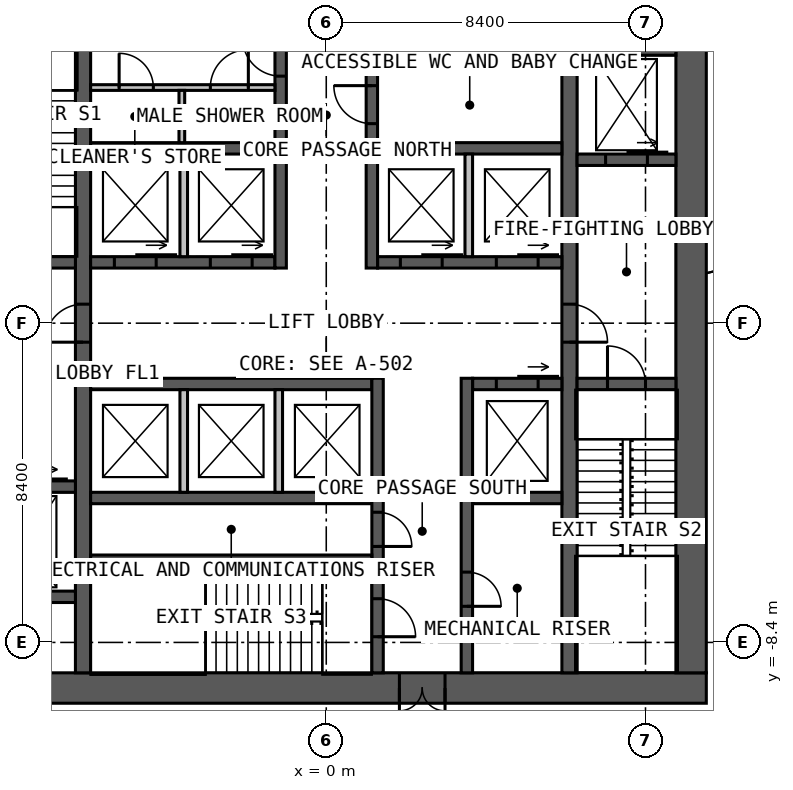
"""IFC4 building model, lengths in metres.
Left out: names, types, materials, properties, quantities, classifications, styles, units other than length and angle.
Written with IfcOpenShell. Run it as: python <this file> out.ifc"""

import sys

from ifc_helpers import new_model, si_unit, direction, frame, frame_2d, origin, place, context, subcontext, project, spatial, rectangle, extrude, element, fill, save


model = new_model("IFC4")
c1 = context("Model", 3, precision=1e-05, world=origin(), true_north=direction((0.0, 1.0)))
c2 = subcontext(c1, "Body", "Model", "MODEL_VIEW")
j1 = project(units=[si_unit("LENGTHUNIT", "METRE"), si_unit("PLANEANGLEUNIT", "RADIAN")], contexts=[c1])
p1 = place(None, origin())
s1 = spatial("IfcSite", under=j1, at=p1, CompositionType="ELEMENT")
p2 = place(p1, origin())
s2 = spatial("IfcBuilding", under=s1, at=p2, CompositionType="ELEMENT")
p3 = place(p2, frame((0.0, 0.0, 41.0)))
s3 = spatial("IfcBuildingStorey", under=s2, at=p3, CompositionType="ELEMENT", Elevation=41.0)
p4 = place(p3, frame((10.0, -9.6, 0.0), z_axis=(0.0, 0.0, 1.0), x_axis=(-1.0, 0.0, 0.0)))
e1 = element("IfcWall", 1, at=p4, inside=s3, PredefinedType="SOLIDWALL", context=c2, shape_type="SweptSolid", body=[
    extrude(rectangle(XDim=20.0, YDim=0.8, at=frame_2d((10.0, 0.0))), origin(), (0.0, 0.0, 1.0), 4.0),
])
p5 = place(p4, frame((6.875, 0.0, 0.0)))
e2 = element("IfcOpeningElement", 2, at=p5, cuts=e1, PredefinedType="OPENING", context=c2, shape_type="SweptSolid", body=[
    extrude(rectangle(XDim=1.2, YDim=2.2, at=frame_2d((0.6, 1.1))), frame((0.0, 0.41, 0.0), z_axis=(0.0, -1.0, 0.0), x_axis=(1.0, 0.0, 0.0)), (0.0, 0.0, 1.0), 0.82),
])
p6 = place(p3, frame((9.6, -9.2, 0.0), z_axis=(0.0, 0.0, 1.0), x_axis=(0.0, 1.0, 0.0)))
e3 = element("IfcWall", 3, at=p6, inside=s3, PredefinedType="SOLIDWALL", context=c2, shape_type="SweptSolid", body=[
    extrude(rectangle(XDim=18.4, YDim=0.8, at=frame_2d((9.2, 0.0))), origin(), (0.0, 0.0, 1.0), 4.0),
])
p7 = place(p3, frame((-6.4, -9.2, 0.0), z_axis=(0.0, 0.0, 1.0), x_axis=(0.0, 1.0, 0.0)))
e4 = element("IfcWall", 4, at=p7, inside=s3, PredefinedType="SOLIDWALL", context=c2, shape_type="SweptSolid", body=[
    extrude(rectangle(XDim=18.4, YDim=0.4, at=frame_2d((9.2, 0.0))), origin(), (0.0, 0.0, 1.0), 4.0),
])
p8 = place(p7, frame((8.7, 0.0, 0.0)))
e5 = element("IfcOpeningElement", 5, at=p8, cuts=e4, PredefinedType="OPENING", context=c2, shape_type="SweptSolid", body=[
    extrude(rectangle(XDim=1.0, YDim=2.2, at=frame_2d((0.5, 1.1))), frame((0.0, 0.21, 0.0), z_axis=(0.0, -1.0, 0.0), x_axis=(1.0, 0.0, 0.0)), (0.0, 0.0, 1.0), 0.42),
])
p9 = place(p3, frame((6.4, 9.2, 0.0), z_axis=(0.0, 0.0, 1.0), x_axis=(0.0, -1.0, 0.0)))
e6 = element("IfcWall", 6, at=p9, inside=s3, PredefinedType="SOLIDWALL", context=c2, shape_type="SweptSolid", body=[
    extrude(rectangle(XDim=18.4, YDim=0.4, at=frame_2d((9.2, 0.0))), origin(), (0.0, 0.0, 1.0), 4.0),
])
p10 = place(p9, frame((8.7, 0.0, 0.0)))
e7 = element("IfcOpeningElement", 7, at=p10, cuts=e6, PredefinedType="OPENING", context=c2, shape_type="SweptSolid", body=[
    extrude(rectangle(XDim=1.0, YDim=2.2, at=frame_2d((0.5, 1.1))), frame((0.0, 0.21, 0.0), z_axis=(0.0, -1.0, 0.0), x_axis=(1.0, 0.0, 0.0)), (0.0, 0.0, 1.0), 0.42),
])
p11 = place(p3, frame((-6.2, 1.6, 0.0), z_axis=(0.0, 0.0, 1.0), x_axis=(1.0, 0.0, 0.0)))
e8 = element("IfcWall", 8, at=p11, inside=s3, PredefinedType="SOLIDWALL", context=c2, shape_type="SweptSolid", body=[
    extrude(rectangle(XDim=4.85, YDim=0.3, at=frame_2d((2.425, 0.0))), origin(), (0.0, 0.0, 1.0), 4.0),
])
p12 = place(p11, frame((0.625, 0.0, 0.0)))
e9 = element("IfcOpeningElement", 9, at=p12, cuts=e8, PredefinedType="OPENING", context=c2, shape_type="SweptSolid", body=[
    extrude(rectangle(XDim=1.1, YDim=2.2, at=frame_2d((0.55, 1.1))), frame((0.0, 0.16, 0.0), z_axis=(0.0, -1.0, 0.0), x_axis=(1.0, 0.0, 0.0)), (0.0, 0.0, 1.0), 0.32),
])
p13 = place(p11, frame((3.15, 0.0, 0.0)))
e10 = element("IfcOpeningElement", 10, at=p13, cuts=e8, PredefinedType="OPENING", context=c2, shape_type="SweptSolid", body=[
    extrude(rectangle(XDim=1.1, YDim=2.2, at=frame_2d((0.55, 1.1))), frame((0.0, 0.16, 0.0), z_axis=(0.0, -1.0, 0.0), x_axis=(1.0, 0.0, 0.0)), (0.0, 0.0, 1.0), 0.32),
])
p14 = place(p3, frame((1.35, 1.6, 0.0), z_axis=(0.0, 0.0, 1.0), x_axis=(1.0, 0.0, 0.0)))
e11 = element("IfcWall", 11, at=p14, inside=s3, PredefinedType="SOLIDWALL", context=c2, shape_type="SweptSolid", body=[
    extrude(rectangle(XDim=4.85, YDim=0.3, at=frame_2d((2.425, 0.0))), origin(), (0.0, 0.0, 1.0), 4.0),
])
p15 = place(p14, frame((0.6, 0.0, 0.0)))
e12 = element("IfcOpeningElement", 12, at=p15, cuts=e11, PredefinedType="OPENING", context=c2, shape_type="SweptSolid", body=[
    extrude(rectangle(XDim=1.1, YDim=2.2, at=frame_2d((0.55, 1.1))), frame((0.0, 0.16, 0.0), z_axis=(0.0, -1.0, 0.0), x_axis=(1.0, 0.0, 0.0)), (0.0, 0.0, 1.0), 0.32),
])
p16 = place(p14, frame((3.125, 0.0, 0.0)))
e13 = element("IfcOpeningElement", 13, at=p16, cuts=e11, PredefinedType="OPENING", context=c2, shape_type="SweptSolid", body=[
    extrude(rectangle(XDim=1.1, YDim=2.2, at=frame_2d((0.55, 1.1))), frame((0.0, 0.16, 0.0), z_axis=(0.0, -1.0, 0.0), x_axis=(1.0, 0.0, 0.0)), (0.0, 0.0, 1.0), 0.32),
])
for number, where, z_axis, x_axis in (
    (14, (-6.2, 4.6, 0.0), (0.0, 0.0, 1.0), (1.0, 0.0, 0.0)),
    (15, (1.35, 4.6, 0.0), (0.0, 0.0, 1.0), (1.0, 0.0, 0.0)),
):
    element("IfcWall", number, at=place(p3, frame(where, z_axis=z_axis, x_axis=x_axis)), inside=s3, PredefinedType="SOLIDWALL", context=c2, shape_type="SweptSolid", body=[
        extrude(rectangle(XDim=4.85, YDim=0.3, at=frame_2d((2.425, 0.0))), origin(), (0.0, 0.0, 1.0), 4.0),
    ])
p17 = place(p3, frame((-1.2, 1.45, 0.0), z_axis=(0.0, 0.0, 1.0), x_axis=(0.0, 1.0, 0.0)))
e16 = element("IfcWall", 16, at=p17, inside=s3, PredefinedType="SOLIDWALL", context=c2, shape_type="SweptSolid", body=[
    extrude(rectangle(XDim=7.75, YDim=0.3, at=frame_2d((3.875, 0.0))), origin(), (0.0, 0.0, 1.0), 4.0),
])
p18 = place(p17, frame((5.05, 0.0, 0.0)))
e17 = element("IfcOpeningElement", 17, at=p18, cuts=e16, PredefinedType="OPENING", context=c2, shape_type="SweptSolid", body=[
    extrude(rectangle(XDim=1.0, YDim=2.2, at=frame_2d((0.5, 1.1))), frame((0.0, 0.16, 0.0), z_axis=(0.0, -1.0, 0.0), x_axis=(1.0, 0.0, 0.0)), (0.0, 0.0, 1.0), 0.32),
])
p19 = place(p3, frame((1.2, 1.45, 0.0), z_axis=(0.0, 0.0, 1.0), x_axis=(0.0, 1.0, 0.0)))
e18 = element("IfcWall", 18, at=p19, inside=s3, PredefinedType="SOLIDWALL", context=c2, shape_type="SweptSolid", body=[
    extrude(rectangle(XDim=7.75, YDim=0.3, at=frame_2d((3.875, 0.0))), origin(), (0.0, 0.0, 1.0), 4.0),
])
p20 = place(p19, frame((3.8, 0.0, 0.0)))
e19 = element("IfcOpeningElement", 19, at=p20, cuts=e18, PredefinedType="OPENING", context=c2, shape_type="SweptSolid", body=[
    extrude(rectangle(XDim=1.0, YDim=2.2, at=frame_2d((0.5, 1.1))), frame((0.0, 0.16, 0.0), z_axis=(0.0, -1.0, 0.0), x_axis=(1.0, 0.0, 0.0)), (0.0, 0.0, 1.0), 0.32),
])
p21 = place(p19, frame((6.15, 0.0, 0.0)))
e20 = element("IfcOpeningElement", 20, at=p21, cuts=e18, PredefinedType="OPENING", context=c2, shape_type="SweptSolid", body=[
    extrude(rectangle(XDim=1.0, YDim=2.2, at=frame_2d((0.5, 1.1))), frame((0.0, 0.16, 0.0), z_axis=(0.0, -1.0, 0.0), x_axis=(1.0, 0.0, 0.0)), (0.0, 0.0, 1.0), 0.32),
])
p22 = place(p3, frame((-6.2, -1.6, 0.0), z_axis=(0.0, 0.0, 1.0), x_axis=(1.0, 0.0, 0.0)))
e21 = element("IfcWall", 21, at=p22, inside=s3, PredefinedType="SOLIDWALL", context=c2, shape_type="SweptSolid", body=[
    extrude(rectangle(XDim=7.4, YDim=0.3, at=frame_2d((3.7, 0.0))), origin(), (0.0, 0.0, 1.0), 4.0),
])
p23 = place(p3, frame((3.85, -1.6, 0.0), z_axis=(0.0, 0.0, 1.0), x_axis=(1.0, 0.0, 0.0)))
e22 = element("IfcWall", 22, at=p23, inside=s3, PredefinedType="SOLIDWALL", context=c2, shape_type="SweptSolid", body=[
    extrude(rectangle(XDim=2.35, YDim=0.3, at=frame_2d((1.175, 0.0))), origin(), (0.0, 0.0, 1.0), 4.0),
])
p24 = place(p23, frame((0.625, 0.0, 0.0)))
e23 = element("IfcOpeningElement", 23, at=p24, cuts=e22, PredefinedType="OPENING", context=c2, shape_type="SweptSolid", body=[
    extrude(rectangle(XDim=1.1, YDim=2.2, at=frame_2d((0.55, 1.1))), frame((0.0, 0.16, 0.0), z_axis=(0.0, -1.0, 0.0), x_axis=(1.0, 0.0, 0.0)), (0.0, 0.0, 1.0), 0.32),
])
p25 = place(p3, frame((-6.2, -4.6, 0.0), z_axis=(0.0, 0.0, 1.0), x_axis=(1.0, 0.0, 0.0)))
e24 = element("IfcWall", 24, at=p25, inside=s3, PredefinedType="SOLIDWALL", context=c2, shape_type="SweptSolid", body=[
    extrude(rectangle(XDim=7.4, YDim=0.3, at=frame_2d((3.7, 0.0))), origin(), (0.0, 0.0, 1.0), 4.0),
])
p26 = place(p3, frame((3.85, -4.6, 0.0), z_axis=(0.0, 0.0, 1.0), x_axis=(1.0, 0.0, 0.0)))
e25 = element("IfcWall", 25, at=p26, inside=s3, PredefinedType="SOLIDWALL", context=c2, shape_type="SweptSolid", body=[
    extrude(rectangle(XDim=2.35, YDim=0.3, at=frame_2d((1.175, 0.0))), origin(), (0.0, 0.0, 1.0), 4.0),
])
p27 = place(p3, frame((1.35, -1.45, 0.0), z_axis=(0.0, 0.0, 1.0), x_axis=(0.0, -1.0, 0.0)))
e26 = element("IfcWall", 26, at=p27, inside=s3, PredefinedType="SOLIDWALL", context=c2, shape_type="SweptSolid", body=[
    extrude(rectangle(XDim=7.75, YDim=0.3, at=frame_2d((3.875, 0.0))), origin(), (0.0, 0.0, 1.0), 4.0),
])
p28 = place(p27, frame((5.8, 0.0, 0.0)))
e27 = element("IfcOpeningElement", 27, at=p28, cuts=e26, PredefinedType="OPENING", context=c2, shape_type="SweptSolid", body=[
    extrude(rectangle(XDim=1.0, YDim=2.2, at=frame_2d((0.5, 1.1))), frame((0.0, 0.16, 0.0), z_axis=(0.0, -1.0, 0.0), x_axis=(1.0, 0.0, 0.0)), (0.0, 0.0, 1.0), 0.32),
])
p29 = place(p27, frame((3.525, 0.0, 0.0)))
e28 = element("IfcOpeningElement", 28, at=p29, cuts=e26, PredefinedType="OPENING", context=c2, shape_type="SweptSolid", body=[
    extrude(rectangle(XDim=0.9, YDim=2.2, at=frame_2d((0.45, 1.1))), frame((0.0, 0.16, 0.0), z_axis=(0.0, -1.0, 0.0), x_axis=(1.0, 0.0, 0.0)), (0.0, 0.0, 1.0), 0.32),
])
p30 = place(p3, frame((3.7, -1.45, 0.0), z_axis=(0.0, 0.0, 1.0), x_axis=(0.0, -1.0, 0.0)))
e29 = element("IfcWall", 29, at=p30, inside=s3, PredefinedType="SOLIDWALL", context=c2, shape_type="SweptSolid", body=[
    extrude(rectangle(XDim=7.75, YDim=0.3, at=frame_2d((3.875, 0.0))), origin(), (0.0, 0.0, 1.0), 4.0),
])
p31 = place(p30, frame((5.1, 0.0, 0.0)))
e30 = element("IfcOpeningElement", 30, at=p31, cuts=e29, PredefinedType="OPENING", context=c2, shape_type="SweptSolid", body=[
    extrude(rectangle(XDim=0.9, YDim=2.2, at=frame_2d((0.45, 1.1))), frame((0.0, 0.16, 0.0), z_axis=(0.0, -1.0, 0.0), x_axis=(1.0, 0.0, 0.0)), (0.0, 0.0, 1.0), 0.32),
])
p32 = place(p3, frame((-6.2, -6.2, 0.0), z_axis=(0.0, 0.0, 1.0), x_axis=(1.0, 0.0, 0.0)))
e31 = element("IfcWall", 31, at=p32, inside=s3, PredefinedType="SOLIDWALL", context=c2, shape_type="SweptSolid", body=[
    extrude(rectangle(XDim=7.4, YDim=0.2, at=frame_2d((3.7, 0.0))), origin(), (0.0, 0.0, 1.0), 4.0),
])
p33 = place(p3, frame((-9.2, 1.6, 0.0), z_axis=(0.0, 0.0, 1.0), x_axis=(1.0, 0.0, 0.0)))
e32 = element("IfcWall", 32, at=p33, inside=s3, PredefinedType="SOLIDWALL", context=c2, shape_type="SweptSolid", body=[
    extrude(rectangle(XDim=2.6, YDim=0.3, at=frame_2d((1.3, 0.0))), origin(), (0.0, 0.0, 1.0), 4.0),
])
p34 = place(p33, frame((0.8, 0.0, 0.0)))
e33 = element("IfcOpeningElement", 33, at=p34, cuts=e32, PredefinedType="OPENING", context=c2, shape_type="SweptSolid", body=[
    extrude(rectangle(XDim=1.0, YDim=2.2, at=frame_2d((0.5, 1.1))), frame((0.0, 0.16, 0.0), z_axis=(0.0, -1.0, 0.0), x_axis=(1.0, 0.0, 0.0)), (0.0, 0.0, 1.0), 0.32),
])
p35 = place(p3, frame((6.6, -1.6, 0.0), z_axis=(0.0, 0.0, 1.0), x_axis=(1.0, 0.0, 0.0)))
e34 = element("IfcWall", 34, at=p35, inside=s3, PredefinedType="SOLIDWALL", context=c2, shape_type="SweptSolid", body=[
    extrude(rectangle(XDim=2.6, YDim=0.3, at=frame_2d((1.3, 0.0))), origin(), (0.0, 0.0, 1.0), 4.0),
])
p36 = place(p35, frame((0.8, 0.0, 0.0)))
e35 = element("IfcOpeningElement", 35, at=p36, cuts=e34, PredefinedType="OPENING", context=c2, shape_type="SweptSolid", body=[
    extrude(rectangle(XDim=1.0, YDim=2.2, at=frame_2d((0.5, 1.1))), frame((0.0, 0.16, 0.0), z_axis=(0.0, -1.0, 0.0), x_axis=(1.0, 0.0, 0.0)), (0.0, 0.0, 1.0), 0.32),
])
p37 = place(p3, frame((-9.2, -4.3, 0.0), z_axis=(0.0, 0.0, 1.0), x_axis=(1.0, 0.0, 0.0)))
e36 = element("IfcWall", 36, at=p37, inside=s3, PredefinedType="SOLIDWALL", context=c2, shape_type="SweptSolid", body=[
    extrude(rectangle(XDim=2.6, YDim=0.3, at=frame_2d((1.3, 0.0))), origin(), (0.0, 0.0, 1.0), 4.0),
])
p38 = place(p37, frame((0.75, 0.0, 0.0)))
e37 = element("IfcOpeningElement", 37, at=p38, cuts=e36, PredefinedType="OPENING", context=c2, shape_type="SweptSolid", body=[
    extrude(rectangle(XDim=1.1, YDim=2.2, at=frame_2d((0.55, 1.1))), frame((0.0, 0.16, 0.0), z_axis=(0.0, -1.0, 0.0), x_axis=(1.0, 0.0, 0.0)), (0.0, 0.0, 1.0), 0.32),
])
p39 = place(p3, frame((6.6, 4.3, 0.0), z_axis=(0.0, 0.0, 1.0), x_axis=(1.0, 0.0, 0.0)))
e38 = element("IfcWall", 38, at=p39, inside=s3, PredefinedType="SOLIDWALL", context=c2, shape_type="SweptSolid", body=[
    extrude(rectangle(XDim=2.6, YDim=0.3, at=frame_2d((1.3, 0.0))), origin(), (0.0, 0.0, 1.0), 4.0),
])
p40 = place(p39, frame((0.75, 0.0, 0.0)))
e39 = element("IfcOpeningElement", 39, at=p40, cuts=e38, PredefinedType="OPENING", context=c2, shape_type="SweptSolid", body=[
    extrude(rectangle(XDim=1.1, YDim=2.2, at=frame_2d((0.55, 1.1))), frame((0.0, 0.16, 0.0), z_axis=(0.0, -1.0, 0.0), x_axis=(1.0, 0.0, 0.0)), (0.0, 0.0, 1.0), 0.32),
])
for number, where, z_axis, x_axis in (
    (40, (-9.2, -7.2, 0.0), (0.0, 0.0, 1.0), (1.0, 0.0, 0.0)),
    (41, (6.6, 7.2, 0.0), (0.0, 0.0, 1.0), (1.0, 0.0, 0.0)),
):
    element("IfcWall", number, at=place(p3, frame(where, z_axis=z_axis, x_axis=x_axis)), inside=s3, PredefinedType="SOLIDWALL", context=c2, shape_type="SweptSolid", body=[
        extrude(rectangle(XDim=2.6, YDim=0.3, at=frame_2d((1.3, 0.0))), origin(), (0.0, 0.0, 1.0), 4.0),
    ])
for number, where, z_axis, x_axis in (
    (42, (-3.75, 1.75, 0.0), (0.0, 0.0, 1.0), (0.0, 1.0, 0.0)),
    (43, (3.75, 1.75, 0.0), (0.0, 0.0, 1.0), (0.0, 1.0, 0.0)),
    (44, (-3.75, -1.75, 0.0), (0.0, 0.0, 1.0), (0.0, -1.0, 0.0)),
    (45, (-1.25, -1.75, 0.0), (0.0, 0.0, 1.0), (0.0, -1.0, 0.0)),
):
    element("IfcWall", number, at=place(p3, frame(where, z_axis=z_axis, x_axis=x_axis)), inside=s3, PredefinedType="SOLIDWALL", context=c2, shape_type="SweptSolid", body=[
        extrude(rectangle(XDim=2.7, YDim=0.2, at=frame_2d((1.35, 0.0))), origin(), (0.0, 0.0, 1.0), 3.75),
    ])
p41 = place(p3, frame((1.35, 6.8, 0.0), z_axis=(0.0, 0.0, 1.0), x_axis=(1.0, 0.0, 0.0)))
e46 = element("IfcWall", 46, at=p41, inside=s3, PredefinedType="PARTITIONING", context=c2, shape_type="SweptSolid", body=[
    extrude(rectangle(XDim=4.85, YDim=0.15, at=frame_2d((2.425, 0.0))), origin(), (0.0, 0.0, 1.0), 3.75),
])
p42 = place(p3, frame((-6.2, 6.2, 0.0), z_axis=(0.0, 0.0, 1.0), x_axis=(1.0, 0.0, 0.0)))
e47 = element("IfcWall", 47, at=p42, inside=s3, PredefinedType="PARTITIONING", context=c2, shape_type="SweptSolid", body=[
    extrude(rectangle(XDim=4.85, YDim=0.15, at=frame_2d((2.425, 0.0))), origin(), (0.0, 0.0, 1.0), 3.75),
])
p43 = place(p42, frame((3.15, 0.0, 0.0)))
e48 = element("IfcOpeningElement", 48, at=p43, cuts=e47, PredefinedType="OPENING", context=c2, shape_type="SweptSolid", body=[
    extrude(rectangle(XDim=1.0, YDim=2.2, at=frame_2d((0.5, 1.1))), frame((0.0, 0.085, 0.0), z_axis=(0.0, -1.0, 0.0), x_axis=(1.0, 0.0, 0.0)), (0.0, 0.0, 1.0), 0.17),
])
p44 = place(p42, frame((0.75, 0.0, 0.0)))
e49 = element("IfcOpeningElement", 49, at=p44, cuts=e47, PredefinedType="OPENING", context=c2, shape_type="SweptSolid", body=[
    extrude(rectangle(XDim=0.9, YDim=2.2, at=frame_2d((0.45, 1.1))), frame((0.0, 0.085, 0.0), z_axis=(0.0, -1.0, 0.0), x_axis=(1.0, 0.0, 0.0)), (0.0, 0.0, 1.0), 0.17),
])
p45 = place(p3, frame((-3.8, 4.75, 0.0), z_axis=(0.0, 0.0, 1.0), x_axis=(0.0, 1.0, 0.0)))
e50 = element("IfcWall", 50, at=p45, inside=s3, PredefinedType="PARTITIONING", context=c2, shape_type="SweptSolid", body=[
    extrude(rectangle(XDim=1.375, YDim=0.15, at=frame_2d((0.688, 0.0))), origin(), (0.0, 0.0, 1.0), 3.75),
])
p46 = place(p5, origin())
e51 = element("IfcDoor", 51, at=p46, inside=s3, OperationType="DOUBLE_DOOR_SINGLE_SWING", PredefinedType="DOOR", context=c2, shape_type="SweptSolid", body=[
    extrude(rectangle(XDim=1.2, YDim=2.2, at=frame_2d((0.6, 1.1))), frame((0.0, 0.025, 0.0), z_axis=(0.0, -1.0, 0.0), x_axis=(1.0, 0.0, 0.0)), (0.0, 0.0, 1.0), 0.05),
])
fill(e2, e51)
p47 = place(p8, origin())
e52 = element("IfcDoor", 52, at=p47, inside=s3, OperationType="SINGLE_SWING_LEFT", PredefinedType="DOOR", context=c2, shape_type="SweptSolid", body=[
    extrude(rectangle(XDim=1.0, YDim=2.2, at=frame_2d((0.5, 1.1))), frame((0.0, 0.025, 0.0), z_axis=(0.0, -1.0, 0.0), x_axis=(1.0, 0.0, 0.0)), (0.0, 0.0, 1.0), 0.05),
])
fill(e5, e52)
p48 = place(p10, origin())
e53 = element("IfcDoor", 53, at=p48, inside=s3, OperationType="SINGLE_SWING_RIGHT", PredefinedType="DOOR", context=c2, shape_type="SweptSolid", body=[
    extrude(rectangle(XDim=1.0, YDim=2.2, at=frame_2d((0.5, 1.1))), frame((0.0, 0.025, 0.0), z_axis=(0.0, -1.0, 0.0), x_axis=(1.0, 0.0, 0.0)), (0.0, 0.0, 1.0), 0.05),
])
fill(e7, e53)
p49 = place(p36, origin())
e54 = element("IfcDoor", 54, at=p49, inside=s3, OperationType="SINGLE_SWING_LEFT", PredefinedType="DOOR", context=c2, shape_type="SweptSolid", body=[
    extrude(rectangle(XDim=1.0, YDim=2.2, at=frame_2d((0.5, 1.1))), frame((0.0, 0.025, 0.0), z_axis=(0.0, -1.0, 0.0), x_axis=(1.0, 0.0, 0.0)), (0.0, 0.0, 1.0), 0.05),
])
fill(e35, e54)
p50 = place(p28, origin())
e55 = element("IfcDoor", 55, at=p50, inside=s3, OperationType="SINGLE_SWING_RIGHT", PredefinedType="DOOR", context=c2, shape_type="SweptSolid", body=[
    extrude(rectangle(XDim=1.0, YDim=2.2, at=frame_2d((0.5, 1.1))), frame((0.0, 0.025, 0.0), z_axis=(0.0, -1.0, 0.0), x_axis=(1.0, 0.0, 0.0)), (0.0, 0.0, 1.0), 0.05),
])
fill(e27, e55)
p51 = place(p18, origin())
e56 = element("IfcDoor", 56, at=p51, inside=s3, OperationType="SINGLE_SWING_RIGHT", PredefinedType="DOOR", context=c2, shape_type="SweptSolid", body=[
    extrude(rectangle(XDim=1.0, YDim=2.2, at=frame_2d((0.5, 1.1))), frame((0.0, 0.025, 0.0), z_axis=(0.0, -1.0, 0.0), x_axis=(1.0, 0.0, 0.0)), (0.0, 0.0, 1.0), 0.05),
])
fill(e17, e56)
p52 = place(p20, origin())
e57 = element("IfcDoor", 57, at=p52, inside=s3, OperationType="SINGLE_SWING_RIGHT", PredefinedType="DOOR", context=c2, shape_type="SweptSolid", body=[
    extrude(rectangle(XDim=1.0, YDim=2.2, at=frame_2d((0.5, 1.1))), frame((0.0, 0.025, 0.0), z_axis=(0.0, -1.0, 0.0), x_axis=(1.0, 0.0, 0.0)), (0.0, 0.0, 1.0), 0.05),
])
fill(e19, e57)
p53 = place(p29, origin())
e58 = element("IfcDoor", 58, at=p53, inside=s3, OperationType="SINGLE_SWING_RIGHT", PredefinedType="DOOR", context=c2, shape_type="SweptSolid", body=[
    extrude(rectangle(XDim=0.9, YDim=2.2, at=frame_2d((0.45, 1.1))), frame((0.0, 0.025, 0.0), z_axis=(0.0, -1.0, 0.0), x_axis=(1.0, 0.0, 0.0)), (0.0, 0.0, 1.0), 0.05),
])
fill(e28, e58)
p54 = place(p31, origin())
e59 = element("IfcDoor", 59, at=p54, inside=s3, OperationType="SINGLE_SWING_RIGHT", PredefinedType="DOOR", context=c2, shape_type="SweptSolid", body=[
    extrude(rectangle(XDim=0.9, YDim=2.2, at=frame_2d((0.45, 1.1))), frame((0.0, 0.025, 0.0), z_axis=(0.0, -1.0, 0.0), x_axis=(1.0, 0.0, 0.0)), (0.0, 0.0, 1.0), 0.05),
])
fill(e30, e59)
p55 = place(p43, origin())
e60 = element("IfcDoor", 60, at=p55, inside=s3, OperationType="SINGLE_SWING_RIGHT", PredefinedType="DOOR", context=c2, shape_type="SweptSolid", body=[
    extrude(rectangle(XDim=1.0, YDim=2.2, at=frame_2d((0.5, 1.1))), frame((0.0, 0.025, 0.0), z_axis=(0.0, -1.0, 0.0), x_axis=(1.0, 0.0, 0.0)), (0.0, 0.0, 1.0), 0.05),
])
fill(e48, e60)
p56 = place(p44, origin())
e61 = element("IfcDoor", 61, at=p56, inside=s3, OperationType="SINGLE_SWING_LEFT", PredefinedType="DOOR", context=c2, shape_type="SweptSolid", body=[
    extrude(rectangle(XDim=0.9, YDim=2.2, at=frame_2d((0.45, 1.1))), frame((0.0, 0.025, 0.0), z_axis=(0.0, -1.0, 0.0), x_axis=(1.0, 0.0, 0.0)), (0.0, 0.0, 1.0), 0.05),
])
fill(e49, e61)
p57 = place(p12, origin())
e62 = element("IfcDoor", 62, at=p57, inside=s3, OperationType="SLIDING_TO_LEFT", PredefinedType="DOOR", context=c2, shape_type="SweptSolid", body=[
    extrude(rectangle(XDim=1.1, YDim=2.2, at=frame_2d((0.55, 1.1))), frame((0.0, 0.025, 0.0), z_axis=(0.0, -1.0, 0.0), x_axis=(1.0, 0.0, 0.0)), (0.0, 0.0, 1.0), 0.05),
])
fill(e9, e62)
p58 = place(p13, origin())
e63 = element("IfcDoor", 63, at=p58, inside=s3, OperationType="SLIDING_TO_LEFT", PredefinedType="DOOR", context=c2, shape_type="SweptSolid", body=[
    extrude(rectangle(XDim=1.1, YDim=2.2, at=frame_2d((0.55, 1.1))), frame((0.0, 0.025, 0.0), z_axis=(0.0, -1.0, 0.0), x_axis=(1.0, 0.0, 0.0)), (0.0, 0.0, 1.0), 0.05),
])
fill(e10, e63)
p59 = place(p15, origin())
e64 = element("IfcDoor", 64, at=p59, inside=s3, OperationType="SLIDING_TO_LEFT", PredefinedType="DOOR", context=c2, shape_type="SweptSolid", body=[
    extrude(rectangle(XDim=1.1, YDim=2.2, at=frame_2d((0.55, 1.1))), frame((0.0, 0.025, 0.0), z_axis=(0.0, -1.0, 0.0), x_axis=(1.0, 0.0, 0.0)), (0.0, 0.0, 1.0), 0.05),
])
fill(e12, e64)
p60 = place(p16, origin())
e65 = element("IfcDoor", 65, at=p60, inside=s3, OperationType="SLIDING_TO_LEFT", PredefinedType="DOOR", context=c2, shape_type="SweptSolid", body=[
    extrude(rectangle(XDim=1.1, YDim=2.2, at=frame_2d((0.55, 1.1))), frame((0.0, 0.025, 0.0), z_axis=(0.0, -1.0, 0.0), x_axis=(1.0, 0.0, 0.0)), (0.0, 0.0, 1.0), 0.05),
])
fill(e13, e65)
p61 = place(p24, origin())
e66 = element("IfcDoor", 66, at=p61, inside=s3, OperationType="SLIDING_TO_LEFT", PredefinedType="DOOR", context=c2, shape_type="SweptSolid", body=[
    extrude(rectangle(XDim=1.1, YDim=2.2, at=frame_2d((0.55, 1.1))), frame((0.0, 0.025, 0.0), z_axis=(0.0, -1.0, 0.0), x_axis=(1.0, 0.0, 0.0)), (0.0, 0.0, 1.0), 0.05),
])
fill(e23, e66)
p62 = place(p40, origin())
e67 = element("IfcDoor", 67, at=p62, inside=s3, OperationType="SLIDING_TO_LEFT", PredefinedType="DOOR", context=c2, shape_type="SweptSolid", body=[
    extrude(rectangle(XDim=1.1, YDim=2.2, at=frame_2d((0.55, 1.1))), frame((0.0, 0.025, 0.0), z_axis=(0.0, -1.0, 0.0), x_axis=(1.0, 0.0, 0.0)), (0.0, 0.0, 1.0), 0.05),
])
fill(e39, e67)
save(model, sys.argv[1])
